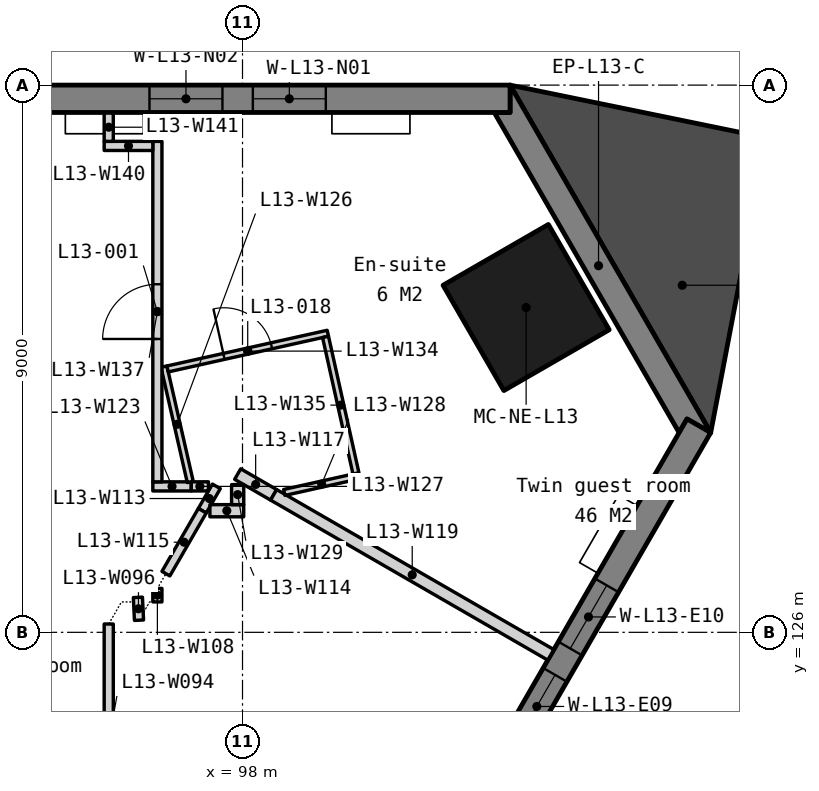
"""IFC4 building model, lengths in metres.
Left out: names, types, materials, properties, quantities, classifications, styles, units other than length and angle.
Written with IfcOpenShell. Run it as: python <this file> out.ifc"""

import sys

from ifc_helpers import new_model, si_unit, direction, frame, frame_2d, origin, origin_2d, place, context, subcontext, project, spatial, polyline, rectangle, outline, extrude, element, fill, save


model = new_model("IFC4")
c1 = context("Model", 3, precision=1e-05, world=origin(), true_north=direction((0.0, 1.0)))
c2 = subcontext(c1, "Body", "Model", "MODEL_VIEW")
j1 = project(units=[si_unit("LENGTHUNIT", "METRE"), si_unit("PLANEANGLEUNIT", "RADIAN")], contexts=[c1])
p1 = place(None, origin())
s1 = spatial("IfcSite", under=j1, at=p1, CompositionType="ELEMENT")
p2 = place(p1, origin())
s2 = spatial("IfcBuilding", under=s1, at=p2, CompositionType="ELEMENT")
p3 = place(p2, frame((0.0, 0.0, 59.5)))
s3 = spatial("IfcBuildingStorey", under=s2, at=p3, CompositionType="ELEMENT", Elevation=59.5)
p4 = place(p3, frame((102.664, 131.342, 0.0), z_axis=(0.0, 0.0, 1.0), x_axis=(-0.5, 0.866025403784, 0.0)))
e1 = element("IfcColumn", 1, at=p4, inside=s3, PredefinedType="COLUMN", context=c2, shape_type="SweptSolid", body=[
    extrude(rectangle(XDim=2.0, YDim=2.0, at=origin_2d()), origin(), (0.0, 0.0, 1.0), 3.5),
])
p5 = place(p3, frame((0.0, 0.0, -0.15)))
e2 = element("IfcWall", 2, at=p5, inside=s3, PredefinedType="SOLIDWALL", context=c2, shape_type="SweptSolid", body=[
    extrude(outline(polyline([(105.7, 129.284), (105.31, 129.509), (105.18, 129.284), (102.14, 134.55), (102.4, 134.55), (102.4, 135.0), (105.7, 129.284)])), origin(), (0.0, 0.0, 1.0), 3.5),
])
p6 = place(p3, frame((102.4, 134.775, -0.15), z_axis=(0.0, 0.0, 1.0), x_axis=(-1.0, 0.0, 0.0)))
e3 = element("IfcWall", 3, at=p6, inside=s3, PredefinedType="SOLIDWALL", context=c2, shape_type="SweptSolid", body=[
    extrude(outline(polyline([(44.8, 0.0), (44.8, 3.5), (0.0, 3.5), (0.0, 0.0), (44.8, 0.0)])), frame((0.0, 0.225, 0.0), z_axis=(0.0, -1.0, 0.0), x_axis=(1.0, 0.0, 0.0)), (0.0, 0.0, 1.0), 0.45),
])
p7 = place(p6, frame((3.03, 0.0, 1.05)))
e4 = element("IfcOpeningElement", 4, at=p7, cuts=e3, PredefinedType="OPENING", context=c2, shape_type="SweptSolid", body=[
    extrude(rectangle(XDim=1.2, YDim=1.5, at=frame_2d((0.6, 0.75))), frame((0.0, 0.235, 0.0), z_axis=(0.0, -1.0, 0.0), x_axis=(1.0, 0.0, 0.0)), (0.0, 0.0, 1.0), 0.47),
])
p8 = place(p6, frame((4.73, 0.0, 1.05)))
e5 = element("IfcOpeningElement", 5, at=p8, cuts=e3, PredefinedType="OPENING", context=c2, shape_type="SweptSolid", body=[
    extrude(rectangle(XDim=1.2, YDim=1.5, at=frame_2d((0.6, 0.75))), frame((0.0, 0.235, 0.0), z_axis=(0.0, -1.0, 0.0), x_axis=(1.0, 0.0, 0.0)), (0.0, 0.0, 1.0), 0.47),
])
p9 = place(p6, frame((11.99, 0.0, 1.05)))
e6 = element("IfcOpeningElement", 6, at=p9, cuts=e3, PredefinedType="OPENING", context=c2, shape_type="SweptSolid", body=[
    extrude(rectangle(XDim=1.2, YDim=1.5, at=frame_2d((0.6, 0.75))), frame((0.0, 0.235, 0.0), z_axis=(0.0, -1.0, 0.0), x_axis=(1.0, 0.0, 0.0)), (0.0, 0.0, 1.0), 0.47),
])
p10 = place(p6, frame((13.69, 0.0, 1.05)))
e7 = element("IfcOpeningElement", 7, at=p10, cuts=e3, PredefinedType="OPENING", context=c2, shape_type="SweptSolid", body=[
    extrude(rectangle(XDim=1.2, YDim=1.5, at=frame_2d((0.6, 0.75))), frame((0.0, 0.235, 0.0), z_axis=(0.0, -1.0, 0.0), x_axis=(1.0, 0.0, 0.0)), (0.0, 0.0, 1.0), 0.47),
])
p11 = place(p6, frame((20.95, 0.0, 1.05)))
e8 = element("IfcOpeningElement", 8, at=p11, cuts=e3, PredefinedType="OPENING", context=c2, shape_type="SweptSolid", body=[
    extrude(rectangle(XDim=1.2, YDim=1.5, at=frame_2d((0.6, 0.75))), frame((0.0, 0.235, 0.0), z_axis=(0.0, -1.0, 0.0), x_axis=(1.0, 0.0, 0.0)), (0.0, 0.0, 1.0), 0.47),
])
p12 = place(p6, frame((22.65, 0.0, 1.05)))
e9 = element("IfcOpeningElement", 9, at=p12, cuts=e3, PredefinedType="OPENING", context=c2, shape_type="SweptSolid", body=[
    extrude(rectangle(XDim=1.2, YDim=1.5, at=frame_2d((0.6, 0.75))), frame((0.0, 0.235, 0.0), z_axis=(0.0, -1.0, 0.0), x_axis=(1.0, 0.0, 0.0)), (0.0, 0.0, 1.0), 0.47),
])
p13 = place(p6, frame((29.91, 0.0, 1.05)))
e10 = element("IfcOpeningElement", 10, at=p13, cuts=e3, PredefinedType="OPENING", context=c2, shape_type="SweptSolid", body=[
    extrude(rectangle(XDim=1.2, YDim=1.5, at=frame_2d((0.6, 0.75))), frame((0.0, 0.235, 0.0), z_axis=(0.0, -1.0, 0.0), x_axis=(1.0, 0.0, 0.0)), (0.0, 0.0, 1.0), 0.47),
])
p14 = place(p6, frame((31.61, 0.0, 1.05)))
e11 = element("IfcOpeningElement", 11, at=p14, cuts=e3, PredefinedType="OPENING", context=c2, shape_type="SweptSolid", body=[
    extrude(rectangle(XDim=1.2, YDim=1.5, at=frame_2d((0.6, 0.75))), frame((0.0, 0.235, 0.0), z_axis=(0.0, -1.0, 0.0), x_axis=(1.0, 0.0, 0.0)), (0.0, 0.0, 1.0), 0.47),
])
p15 = place(p6, frame((38.87, 0.0, 1.05)))
e12 = element("IfcOpeningElement", 12, at=p15, cuts=e3, PredefinedType="OPENING", context=c2, shape_type="SweptSolid", body=[
    extrude(rectangle(XDim=1.2, YDim=1.5, at=frame_2d((0.6, 0.75))), frame((0.0, 0.235, 0.0), z_axis=(0.0, -1.0, 0.0), x_axis=(1.0, 0.0, 0.0)), (0.0, 0.0, 1.0), 0.47),
])
p16 = place(p6, frame((40.57, 0.0, 1.05)))
e13 = element("IfcOpeningElement", 13, at=p16, cuts=e3, PredefinedType="OPENING", context=c2, shape_type="SweptSolid", body=[
    extrude(rectangle(XDim=1.2, YDim=1.5, at=frame_2d((0.6, 0.75))), frame((0.0, 0.235, 0.0), z_axis=(0.0, -1.0, 0.0), x_axis=(1.0, 0.0, 0.0)), (0.0, 0.0, 1.0), 0.47),
])
p17 = place(p3, frame((83.105, 90.599, -0.15), z_axis=(0.0, 0.0, 1.0), x_axis=(0.499999201451, 0.866025864826, 0.0)))
e14 = element("IfcWall", 14, at=p17, inside=s3, PredefinedType="SOLIDWALL", context=c2, shape_type="SweptSolid", body=[
    extrude(outline(polyline([(44.8, 0.0), (44.8, 3.5), (0.0, 3.5), (0.0, 0.0), (44.8, 0.0)])), frame((0.0, 0.225, 0.0), z_axis=(0.0, -1.0, 0.0), x_axis=(1.0, 0.0, 0.0)), (0.0, 0.0, 1.0), 0.45),
])
p18 = place(p17, frame((3.03, 0.0, 1.05)))
e15 = element("IfcOpeningElement", 15, at=p18, cuts=e14, PredefinedType="OPENING", context=c2, shape_type="SweptSolid", body=[
    extrude(rectangle(XDim=1.2, YDim=1.5, at=frame_2d((0.6, 0.75))), frame((0.0, 0.235, 0.0), z_axis=(0.0, -1.0, 0.0), x_axis=(1.0, 0.0, 0.0)), (0.0, 0.0, 1.0), 0.47),
])
p19 = place(p17, frame((4.73, 0.0, 1.05)))
e16 = element("IfcOpeningElement", 16, at=p19, cuts=e14, PredefinedType="OPENING", context=c2, shape_type="SweptSolid", body=[
    extrude(rectangle(XDim=1.2, YDim=1.5, at=frame_2d((0.6, 0.75))), frame((0.0, 0.235, 0.0), z_axis=(0.0, -1.0, 0.0), x_axis=(1.0, 0.0, 0.0)), (0.0, 0.0, 1.0), 0.47),
])
p20 = place(p17, frame((11.99, 0.0, 1.05)))
e17 = element("IfcOpeningElement", 17, at=p20, cuts=e14, PredefinedType="OPENING", context=c2, shape_type="SweptSolid", body=[
    extrude(rectangle(XDim=1.2, YDim=1.5, at=frame_2d((0.6, 0.75))), frame((0.0, 0.235, 0.0), z_axis=(0.0, -1.0, 0.0), x_axis=(1.0, 0.0, 0.0)), (0.0, 0.0, 1.0), 0.47),
])
p21 = place(p17, frame((13.69, 0.0, 1.05)))
e18 = element("IfcOpeningElement", 18, at=p21, cuts=e14, PredefinedType="OPENING", context=c2, shape_type="SweptSolid", body=[
    extrude(rectangle(XDim=1.2, YDim=1.5, at=frame_2d((0.6, 0.75))), frame((0.0, 0.235, 0.0), z_axis=(0.0, -1.0, 0.0), x_axis=(1.0, 0.0, 0.0)), (0.0, 0.0, 1.0), 0.47),
])
p22 = place(p17, frame((20.95, 0.0, 1.05)))
e19 = element("IfcOpeningElement", 19, at=p22, cuts=e14, PredefinedType="OPENING", context=c2, shape_type="SweptSolid", body=[
    extrude(rectangle(XDim=1.2, YDim=1.5, at=frame_2d((0.6, 0.75))), frame((0.0, 0.235, 0.0), z_axis=(0.0, -1.0, 0.0), x_axis=(1.0, 0.0, 0.0)), (0.0, 0.0, 1.0), 0.47),
])
p23 = place(p17, frame((22.65, 0.0, 1.05)))
e20 = element("IfcOpeningElement", 20, at=p23, cuts=e14, PredefinedType="OPENING", context=c2, shape_type="SweptSolid", body=[
    extrude(rectangle(XDim=1.2, YDim=1.5, at=frame_2d((0.6, 0.75))), frame((0.0, 0.235, 0.0), z_axis=(0.0, -1.0, 0.0), x_axis=(1.0, 0.0, 0.0)), (0.0, 0.0, 1.0), 0.47),
])
p24 = place(p17, frame((29.91, 0.0, 1.05)))
e21 = element("IfcOpeningElement", 21, at=p24, cuts=e14, PredefinedType="OPENING", context=c2, shape_type="SweptSolid", body=[
    extrude(rectangle(XDim=1.2, YDim=1.5, at=frame_2d((0.6, 0.75))), frame((0.0, 0.235, 0.0), z_axis=(0.0, -1.0, 0.0), x_axis=(1.0, 0.0, 0.0)), (0.0, 0.0, 1.0), 0.47),
])
p25 = place(p17, frame((31.61, 0.0, 1.05)))
e22 = element("IfcOpeningElement", 22, at=p25, cuts=e14, PredefinedType="OPENING", context=c2, shape_type="SweptSolid", body=[
    extrude(rectangle(XDim=1.2, YDim=1.5, at=frame_2d((0.6, 0.75))), frame((0.0, 0.235, 0.0), z_axis=(0.0, -1.0, 0.0), x_axis=(1.0, 0.0, 0.0)), (0.0, 0.0, 1.0), 0.47),
])
p26 = place(p17, frame((38.87, 0.0, 1.05)))
e23 = element("IfcOpeningElement", 23, at=p26, cuts=e14, PredefinedType="OPENING", context=c2, shape_type="SweptSolid", body=[
    extrude(rectangle(XDim=1.2, YDim=1.5, at=frame_2d((0.6, 0.75))), frame((0.0, 0.235, 0.0), z_axis=(0.0, -1.0, 0.0), x_axis=(1.0, 0.0, 0.0)), (0.0, 0.0, 1.0), 0.47),
])
p27 = place(p17, frame((40.57, 0.0, 1.05)))
e24 = element("IfcOpeningElement", 24, at=p27, cuts=e14, PredefinedType="OPENING", context=c2, shape_type="SweptSolid", body=[
    extrude(rectangle(XDim=1.2, YDim=1.5, at=frame_2d((0.6, 0.75))), frame((0.0, 0.235, 0.0), z_axis=(0.0, -1.0, 0.0), x_axis=(1.0, 0.0, 0.0)), (0.0, 0.0, 1.0), 0.47),
])
p28 = place(p3, frame((0.0, 0.0, -0.15)))
e25 = element("IfcWall", 25, at=p28, inside=s3, PredefinedType="SOLIDWALL", context=c2, shape_type="SweptSolid", body=[
    extrude(outline(polyline([(105.7, 129.284), (106.626, 134.132), (102.4, 135.0), (105.7, 129.284)])), origin(), (0.0, 0.0, 1.0), 3.5),
])
p29 = place(p3, frame((95.8, 122.252, 0.0), z_axis=(0.0, 0.0, 1.0), x_axis=(0.0, 1.0, 0.0)))
e26 = element("IfcWall", 26, at=p29, inside=s3, PredefinedType="PARTITIONING", context=c2, shape_type="SweptSolid", body=[
    extrude(rectangle(XDim=3.885, YDim=0.15, at=frame_2d((1.942, 0.0))), origin(), (0.0, 0.0, 1.0), 3.35),
])
p30 = place(p29, frame((1.492, 0.0, 0.0)))
e27 = element("IfcOpeningElement", 27, at=p30, cuts=e26, PredefinedType="OPENING", context=c2, shape_type="SweptSolid", body=[
    extrude(rectangle(XDim=0.9, YDim=2.1, at=frame_2d((0.45, 1.05))), frame((0.0, 0.085, 0.0), z_axis=(0.0, -1.0, 0.0), x_axis=(1.0, 0.0, 0.0)), (0.0, 0.0, 1.0), 0.17),
])
p31 = place(p3, frame((96.28, 126.575, 0.0), z_axis=(0.0, 0.0, 1.0), x_axis=(0.049354603538, -0.998781318963, 0.0)))
e28 = element("IfcWall", 28, at=p31, inside=s3, PredefinedType="PARTITIONING", context=c2, shape_type="SweptSolid", body=[
    extrude(rectangle(XDim=0.376, YDim=0.15, at=frame_2d((0.188, 0.0))), origin(), (0.0, 0.0, 1.0), 3.35),
])
p32 = place(p3, frame((96.6, 126.5, 0.0), z_axis=(0.0, 0.0, 1.0), x_axis=(0.0, 1.0, 0.0)))
e29 = element("IfcWall", 29, at=p32, inside=s3, PredefinedType="PARTITIONING", context=c2, shape_type="SweptSolid", body=[
    extrude(rectangle(XDim=0.223, YDim=0.15, at=frame_2d((0.111, 0.0))), origin(), (0.0, 0.0, 1.0), 3.35),
])
p33 = place(p3, frame((97.339, 128.0, 0.0), z_axis=(0.0, 0.0, 1.0), x_axis=(0.500391795928, 0.865799082101, 0.0)))
e30 = element("IfcWall", 30, at=p33, inside=s3, PredefinedType="PARTITIONING", context=c2, shape_type="SweptSolid", body=[
    extrude(rectangle(XDim=0.463, YDim=0.15, at=frame_2d((0.231, 0.0))), origin(), (0.0, 0.0, 1.0), 3.35),
])
p34 = place(p3, frame((97.464, 128.0, 0.0), z_axis=(0.0, 0.0, 1.0), x_axis=(1.0, 0.0, 0.0)))
e31 = element("IfcWall", 31, at=p34, inside=s3, PredefinedType="PARTITIONING", context=c2, shape_type="SweptSolid", body=[
    extrude(rectangle(XDim=0.556, YDim=0.2, at=frame_2d((0.278, 0.0))), origin(), (0.0, 0.0, 1.0), 2.938),
])
p35 = place(p3, frame((96.74, 126.965, 0.0), z_axis=(0.0, 0.0, 1.0), x_axis=(0.500529245116, 0.865719628277, 0.0)))
e32 = element("IfcWall", 32, at=p35, inside=s3, PredefinedType="PARTITIONING", context=c2, shape_type="SweptSolid", body=[
    extrude(rectangle(XDim=1.196, YDim=0.15, at=frame_2d((0.598, 0.0))), origin(), (0.0, 0.0, 1.0), 3.35),
])
p36 = place(p3, frame((97.921, 128.603, 0.0), z_axis=(0.0, 0.0, 1.0), x_axis=(0.865989003036, -0.500063042646, 0.0)))
e33 = element("IfcWall", 33, at=p36, inside=s3, PredefinedType="PARTITIONING", context=c2, shape_type="SweptSolid", body=[
    extrude(rectangle(XDim=0.683, YDim=0.2, at=frame_2d((0.341, 0.0))), origin(), (0.0, 0.0, 1.0), 3.35),
])
p37 = place(p3, frame((98.512, 128.261, 0.0), z_axis=(0.0, 0.0, 1.0), x_axis=(0.866031112038, -0.499990112884, 0.0)))
e34 = element("IfcWall", 34, at=p37, inside=s3, PredefinedType="PARTITIONING", context=c2, shape_type="SweptSolid", body=[
    extrude(rectangle(XDim=5.264, YDim=0.2, at=frame_2d((2.632, 0.0))), origin(), (0.0, 0.0, 1.0), 3.35),
])
p38 = place(p3, frame((96.525, 128.4, 0.0), z_axis=(0.0, 0.0, 1.0), x_axis=(1.0, 0.0, 0.0)))
e35 = element("IfcWall", 35, at=p38, inside=s3, PredefinedType="PARTITIONING", context=c2, shape_type="SweptSolid", body=[
    extrude(rectangle(XDim=0.633, YDim=0.15, at=frame_2d((0.316, 0.0))), origin(), (0.0, 0.0, 1.0), 3.35),
])
p39 = place(p3, frame((96.708, 130.37, 0.0), z_axis=(0.0, 0.0, 1.0), x_axis=(0.222402197424, -0.974955005413, 0.0)))
e36 = element("IfcWall", 36, at=p39, inside=s3, PredefinedType="PARTITIONING", context=c2, shape_type="SweptSolid", body=[
    extrude(rectangle(XDim=1.945, YDim=0.1, at=frame_2d((0.973, 0.0))), origin(), (0.0, 0.0, 1.0), 3.35),
])
p40 = place(p3, frame((97.157, 128.4, 0.0), z_axis=(0.0, 0.0, 1.0), x_axis=(0.999996638419, 0.002592903989, 0.0)))
e37 = element("IfcWall", 37, at=p40, inside=s3, PredefinedType="PARTITIONING", context=c2, shape_type="SweptSolid", body=[
    extrude(rectangle(XDim=0.282, YDim=0.15, at=frame_2d((0.141, 0.0))), origin(), (0.0, 0.0, 1.0), 3.35),
])
p41 = place(p3, frame((98.687, 128.301, 0.0), z_axis=(0.0, 0.0, 1.0), x_axis=(0.976063649291, 0.217485062782, 0.0)))
e38 = element("IfcWall", 38, at=p41, inside=s3, PredefinedType="PARTITIONING", context=c2, shape_type="SweptSolid", body=[
    extrude(rectangle(XDim=1.258, YDim=0.1, at=frame_2d((0.629, 0.0))), origin(), (0.0, 0.0, 1.0), 3.35),
])
p42 = place(p3, frame((97.92, 128.1, 0.0), z_axis=(0.0, 0.0, 1.0), x_axis=(0.000740740538, 0.999999725652, 0.0)))
e39 = element("IfcWall", 39, at=p42, inside=s3, PredefinedType="PARTITIONING", context=c2, shape_type="SweptSolid", body=[
    extrude(rectangle(XDim=0.33, YDim=0.2, at=frame_2d((0.165, 0.0))), origin(), (0.0, 0.0, 1.0), 3.35),
])
p43 = place(p3, frame((96.768, 130.332, 0.0), z_axis=(0.0, 0.0, 1.0), x_axis=(0.976069905732, 0.21745698224, 0.0)))
e40 = element("IfcWall", 40, at=p43, inside=s3, PredefinedType="PARTITIONING", context=c2, shape_type="SweptSolid", body=[
    extrude(rectangle(XDim=2.7, YDim=0.1, at=frame_2d((1.35, 0.0))), origin(), (0.0, 0.0, 1.0), 3.35),
])
p44 = place(p43, frame((0.95, 0.0, 0.0)))
e41 = element("IfcOpeningElement", 41, at=p44, cuts=e40, PredefinedType="OPENING", context=c2, shape_type="SweptSolid", body=[
    extrude(rectangle(XDim=0.8, YDim=2.1, at=frame_2d((0.4, 1.05))), frame((0.0, 0.06, 0.0), z_axis=(0.0, -1.0, 0.0), x_axis=(1.0, 0.0, 0.0)), (0.0, 0.0, 1.0), 0.12),
])
p45 = place(p3, frame((99.365, 130.859, 0.0), z_axis=(0.0, 0.0, 1.0), x_axis=(0.217402503607, -0.97608204134, 0.0)))
e42 = element("IfcWall", 42, at=p45, inside=s3, PredefinedType="PARTITIONING", context=c2, shape_type="SweptSolid", body=[
    extrude(rectangle(XDim=2.3, YDim=0.1, at=frame_2d((1.15, 0.0))), origin(), (0.0, 0.0, 1.0), 3.35),
])
p46 = place(p3, frame((96.6, 128.475, 0.0), z_axis=(0.0, 0.0, 1.0), x_axis=(0.0, 1.0, 0.0)))
e43 = element("IfcWall", 43, at=p46, inside=s3, PredefinedType="PARTITIONING", context=c2, shape_type="SweptSolid", body=[
    extrude(rectangle(XDim=5.599, YDim=0.15, at=frame_2d((2.8, 0.0))), origin(), (0.0, 0.0, 1.0), 3.35),
])
p47 = place(p46, frame((2.35, 0.0, 0.0)))
e44 = element("IfcOpeningElement", 44, at=p47, cuts=e43, PredefinedType="OPENING", context=c2, shape_type="SweptSolid", body=[
    extrude(rectangle(XDim=0.9, YDim=2.1, at=frame_2d((0.45, 1.05))), frame((0.0, 0.085, 0.0), z_axis=(0.0, -1.0, 0.0), x_axis=(1.0, 0.0, 0.0)), (0.0, 0.0, 1.0), 0.17),
])
p48 = place(p3, frame((95.725, 134.0, 0.0), z_axis=(0.0, 0.0, 1.0), x_axis=(0.999999813645, -0.000610500497, 0.0)))
e45 = element("IfcWall", 45, at=p48, inside=s3, PredefinedType="PARTITIONING", context=c2, shape_type="SweptSolid", body=[
    extrude(rectangle(XDim=0.8, YDim=0.15, at=frame_2d((0.4, 0.0))), origin(), (0.0, 0.0, 1.0), 2.887),
])
p49 = place(p3, frame((95.8, 134.075, 0.0), z_axis=(0.0, 0.0, 1.0), x_axis=(0.0, 1.0, 0.0)))
e46 = element("IfcWall", 46, at=p49, inside=s3, PredefinedType="PARTITIONING", context=c2, shape_type="SweptSolid", body=[
    extrude(rectangle(XDim=0.465, YDim=0.15, at=frame_2d((0.232, 0.0))), origin(), (0.0, 0.0, 1.0), 3.35),
])
p50 = place(p7, origin())
e47 = element("IfcWindow", 47, at=p50, inside=s3, PartitioningType="SINGLE_PANEL", PredefinedType="WINDOW", context=c2, shape_type="SweptSolid", body=[
    extrude(rectangle(XDim=1.2, YDim=1.5, at=frame_2d((0.6, 0.75))), frame((0.0, 0.03, 0.0), z_axis=(0.0, -1.0, 0.0), x_axis=(1.0, 0.0, 0.0)), (0.0, 0.0, 1.0), 0.06),
])
fill(e4, e47)
p51 = place(p8, origin())
e48 = element("IfcWindow", 48, at=p51, inside=s3, PartitioningType="SINGLE_PANEL", PredefinedType="WINDOW", context=c2, shape_type="SweptSolid", body=[
    extrude(rectangle(XDim=1.2, YDim=1.5, at=frame_2d((0.6, 0.75))), frame((0.0, 0.03, 0.0), z_axis=(0.0, -1.0, 0.0), x_axis=(1.0, 0.0, 0.0)), (0.0, 0.0, 1.0), 0.06),
])
fill(e5, e48)
p52 = place(p26, origin())
e49 = element("IfcWindow", 49, at=p52, inside=s3, PartitioningType="SINGLE_PANEL", PredefinedType="WINDOW", context=c2, shape_type="SweptSolid", body=[
    extrude(rectangle(XDim=1.2, YDim=1.5, at=frame_2d((0.6, 0.75))), frame((0.0, 0.03, 0.0), z_axis=(0.0, -1.0, 0.0), x_axis=(1.0, 0.0, 0.0)), (0.0, 0.0, 1.0), 0.06),
])
fill(e23, e49)
p53 = place(p27, origin())
e50 = element("IfcWindow", 50, at=p53, inside=s3, PartitioningType="SINGLE_PANEL", PredefinedType="WINDOW", context=c2, shape_type="SweptSolid", body=[
    extrude(rectangle(XDim=1.2, YDim=1.5, at=frame_2d((0.6, 0.75))), frame((0.0, 0.03, 0.0), z_axis=(0.0, -1.0, 0.0), x_axis=(1.0, 0.0, 0.0)), (0.0, 0.0, 1.0), 0.06),
])
fill(e24, e50)
p54 = place(p47, origin())
e51 = element("IfcDoor", 51, at=p54, inside=s3, OperationType="SINGLE_SWING_LEFT", PredefinedType="DOOR", context=c2, shape_type="SweptSolid", body=[
    extrude(rectangle(XDim=0.9, YDim=2.1, at=frame_2d((0.45, 1.05))), frame((0.0, 0.025, 0.0), z_axis=(0.0, -1.0, 0.0), x_axis=(1.0, 0.0, 0.0)), (0.0, 0.0, 1.0), 0.05),
])
fill(e44, e51)
p55 = place(p44, origin())
e52 = element("IfcDoor", 52, at=p55, inside=s3, OperationType="SINGLE_SWING_LEFT", PredefinedType="DOOR", context=c2, shape_type="SweptSolid", body=[
    extrude(rectangle(XDim=0.8, YDim=2.1, at=frame_2d((0.4, 1.05))), frame((0.0, 0.025, 0.0), z_axis=(0.0, -1.0, 0.0), x_axis=(1.0, 0.0, 0.0)), (0.0, 0.0, 1.0), 0.05),
])
fill(e41, e52)
save(model, sys.argv[1])
